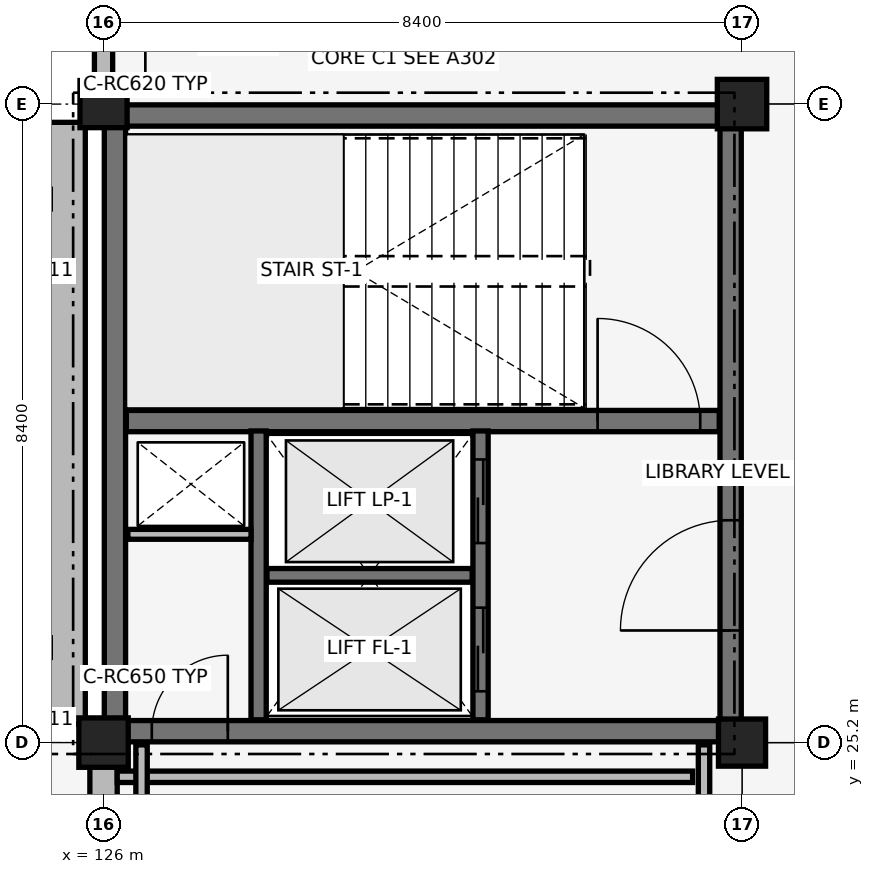
"""IFC4 building model, lengths in metres.
Left out: names, types, materials, properties, quantities, classifications, styles, units other than length and angle.
Written with IfcOpenShell. Run it as: python <this file> out.ifc"""

import sys

from ifc_helpers import new_model, si_unit, direction, frame, frame_2d, origin, origin_2d, place, context, subcontext, project, spatial, rectangle, extrude, element, fill, save


model = new_model("IFC4")
c1 = context("Model", 3, precision=1e-05, world=origin(), true_north=direction((0.0, 1.0)))
c2 = subcontext(c1, "Body", "Model", "MODEL_VIEW")
j1 = project(units=[si_unit("LENGTHUNIT", "METRE"), si_unit("PLANEANGLEUNIT", "RADIAN")], contexts=[c1])
p1 = place(None, origin())
s1 = spatial("IfcSite", under=j1, at=p1, CompositionType="ELEMENT")
p2 = place(p1, origin())
s2 = spatial("IfcBuilding", under=s1, at=p2, CompositionType="ELEMENT")
p3 = place(p2, frame((0.0, 0.0, 13.94)))
s3 = spatial("IfcBuildingStorey", under=s2, at=p3, CompositionType="ELEMENT", Elevation=13.94)
p4 = place(p3, frame((126.15, 25.35, 0.0), z_axis=(0.0, 0.0, 1.0), x_axis=(1.0, 0.0, 0.0)))
e1 = element("IfcWall", 1, at=p4, inside=s3, PredefinedType="SHEAR", context=c2, shape_type="SweptSolid", body=[
    extrude(rectangle(XDim=8.1, YDim=0.28, at=frame_2d((4.05, 0.0))), origin(), (0.0, 0.0, 1.0), 3.78),
])
p5 = place(p4, frame((0.485, 0.0, 0.0)))
e2 = element("IfcOpeningElement", 2, at=p5, cuts=e1, PredefinedType="OPENING", context=c2, shape_type="SweptSolid", body=[
    extrude(rectangle(XDim=1.0, YDim=2.15, at=frame_2d((0.5, 1.075))), frame((0.0, 0.15, 0.0), z_axis=(0.0, -1.0, 0.0), x_axis=(1.0, 0.0, 0.0)), (0.0, 0.0, 1.0), 0.3),
])
p6 = place(p3, frame((126.15, 33.45, 0.0), z_axis=(0.0, 0.0, 1.0), x_axis=(1.0, 0.0, 0.0)))
e3 = element("IfcWall", 3, at=p6, inside=s3, PredefinedType="SHEAR", context=c2, shape_type="SweptSolid", body=[
    extrude(rectangle(XDim=8.1, YDim=0.28, at=frame_2d((4.05, 0.0))), origin(), (0.0, 0.0, 1.0), 3.78),
])
p7 = place(p3, frame((126.15, 25.35, 0.0), z_axis=(0.0, 0.0, 1.0), x_axis=(0.0, 1.0, 0.0)))
e4 = element("IfcWall", 4, at=p7, inside=s3, PredefinedType="SHEAR", context=c2, shape_type="SweptSolid", body=[
    extrude(rectangle(XDim=8.1, YDim=0.28, at=frame_2d((4.05, 0.0))), origin(), (0.0, 0.0, 1.0), 3.78),
])
p8 = place(p3, frame((134.25, 25.35, 0.0), z_axis=(0.0, 0.0, 1.0), x_axis=(0.0, 1.0, 0.0)))
e5 = element("IfcWall", 5, at=p8, inside=s3, PredefinedType="SHEAR", context=c2, shape_type="SweptSolid", body=[
    extrude(rectangle(XDim=8.1, YDim=0.28, at=frame_2d((4.05, 0.0))), origin(), (0.0, 0.0, 1.0), 3.78),
])
p9 = place(p8, frame((1.325, 0.0, 0.0)))
e6 = element("IfcOpeningElement", 6, at=p9, cuts=e5, PredefinedType="OPENING", context=c2, shape_type="SweptSolid", body=[
    extrude(rectangle(XDim=1.45, YDim=2.15, at=frame_2d((0.725, 1.075))), frame((0.0, 0.15, 0.0), z_axis=(0.0, -1.0, 0.0), x_axis=(1.0, 0.0, 0.0)), (0.0, 0.0, 1.0), 0.3),
])
p10 = place(p3, frame((126.3, 29.43, 0.0), z_axis=(0.0, 0.0, 1.0), x_axis=(1.0, 0.0, 0.0)))
e7 = element("IfcWall", 7, at=p10, inside=s3, PredefinedType="SHEAR", context=c2, shape_type="SweptSolid", body=[
    extrude(rectangle(XDim=7.8, YDim=0.28, at=frame_2d((3.9, 0.0))), origin(), (0.0, 0.0, 1.0), 3.78),
])
p11 = place(p10, frame((6.2, 0.0, 0.0)))
e8 = element("IfcOpeningElement", 8, at=p11, cuts=e7, PredefinedType="OPENING", context=c2, shape_type="SweptSolid", body=[
    extrude(rectangle(XDim=1.35, YDim=2.15, at=frame_2d((0.675, 1.075))), frame((0.0, 0.15, 0.0), z_axis=(0.0, -1.0, 0.0), x_axis=(1.0, 0.0, 0.0)), (0.0, 0.0, 1.0), 0.3),
])
p12 = place(p3, frame((126.0, 25.2, 0.0), z_axis=(0.0, 0.0, 1.0), x_axis=(1.0, 0.0, 0.0)))
e9 = element("IfcColumn", 9, at=p12, inside=s3, PredefinedType="COLUMN", context=c2, shape_type="SweptSolid", body=[
    extrude(rectangle(XDim=0.65, YDim=0.65, at=origin_2d()), origin(), (0.0, 0.0, 1.0), 3.78),
])
for number, where, z_axis, x_axis in (
    (10, (126.0, 33.6, 0.0), (0.0, 0.0, 1.0), (1.0, 0.0, 0.0)),
    (11, (134.4, 25.2, 0.0), (0.0, 0.0, 1.0), (1.0, 0.0, 0.0)),
):
    element("IfcColumn", number, at=place(p3, frame(where, z_axis=z_axis, x_axis=x_axis)), inside=s3, PredefinedType="COLUMN", context=c2, shape_type="SweptSolid", body=[
        extrude(rectangle(XDim=0.62, YDim=0.62, at=origin_2d()), origin(), (0.0, 0.0, 1.0), 3.78),
    ])
p13 = place(p3, frame((134.4, 33.6, 0.0), z_axis=(0.0, 0.0, 1.0), x_axis=(1.0, 0.0, 0.0)))
e12 = element("IfcColumn", 12, at=p13, inside=s3, PredefinedType="COLUMN", context=c2, shape_type="SweptSolid", body=[
    extrude(rectangle(XDim=0.65, YDim=0.65, at=origin_2d()), origin(), (0.0, 0.0, 1.0), 3.78),
])
p14 = place(p3, frame((126.0, 17.095, 0.0), z_axis=(0.0, 0.0, 1.0), x_axis=(0.0, 1.0, 0.0)))
e13 = element("IfcWall", 13, at=p14, inside=s3, PredefinedType="SOLIDWALL", context=c2, shape_type="SweptSolid", body=[
    extrude(rectangle(XDim=7.795, YDim=0.36, at=frame_2d((3.897, 0.0))), origin(), (0.0, 0.0, 1.0), 3.15),
])
p15 = place(p14, frame((1.106, 0.0, 0.7)))
e14 = element("IfcOpeningElement", 14, at=p15, cuts=e13, PredefinedType="OPENING", context=c2, shape_type="SweptSolid", body=[
    extrude(rectangle(XDim=0.75, YDim=2.1, at=frame_2d((0.375, 1.05))), frame((0.0, 0.19, 0.0), z_axis=(0.0, -1.0, 0.0), x_axis=(1.0, 0.0, 0.0)), (0.0, 0.0, 1.0), 0.38),
])
p16 = place(p14, frame((2.665, 0.0, 0.7)))
e15 = element("IfcOpeningElement", 15, at=p16, cuts=e13, PredefinedType="OPENING", context=c2, shape_type="SweptSolid", body=[
    extrude(rectangle(XDim=0.75, YDim=2.1, at=frame_2d((0.375, 1.05))), frame((0.0, 0.19, 0.0), z_axis=(0.0, -1.0, 0.0), x_axis=(1.0, 0.0, 0.0)), (0.0, 0.0, 1.0), 0.38),
])
p17 = place(p14, frame((4.38, 0.0, 0.7)))
e16 = element("IfcOpeningElement", 16, at=p17, cuts=e13, PredefinedType="OPENING", context=c2, shape_type="SweptSolid", body=[
    extrude(rectangle(XDim=0.75, YDim=2.1, at=frame_2d((0.375, 1.05))), frame((0.0, 0.19, 0.0), z_axis=(0.0, -1.0, 0.0), x_axis=(1.0, 0.0, 0.0)), (0.0, 0.0, 1.0), 0.38),
])
p18 = place(p14, frame((5.939, 0.0, 0.7)))
e17 = element("IfcOpeningElement", 17, at=p18, cuts=e13, PredefinedType="OPENING", context=c2, shape_type="SweptSolid", body=[
    extrude(rectangle(XDim=0.75, YDim=2.1, at=frame_2d((0.375, 1.05))), frame((0.0, 0.19, 0.0), z_axis=(0.0, -1.0, 0.0), x_axis=(1.0, 0.0, 0.0)), (0.0, 0.0, 1.0), 0.38),
])
p19 = place(p3, frame((125.52, 25.44, 0.0), z_axis=(0.0, 0.0, 1.0), x_axis=(0.0, 1.0, 0.0)))
e18 = element("IfcWall", 18, at=p19, inside=s3, PredefinedType="SOLIDWALL", context=c2, shape_type="SweptSolid", body=[
    extrude(rectangle(XDim=7.92, YDim=0.48, at=frame_2d((3.96, 0.0))), origin(), (0.0, 0.0, 1.0), 4.08),
])
p20 = place(p3, frame((126.0, 33.895, 0.0), z_axis=(0.0, 0.0, 1.0), x_axis=(0.0, 1.0, 0.0)))
e19 = element("IfcWall", 19, at=p20, inside=s3, PredefinedType="SOLIDWALL", context=c2, shape_type="SweptSolid", body=[
    extrude(rectangle(XDim=7.795, YDim=0.24, at=frame_2d((3.897, 0.0))), origin(), (0.0, 0.0, 1.0), 3.15),
])
p21 = place(p20, frame((0.8, 0.0, 0.35)))
e20 = element("IfcOpeningElement", 20, at=p21, cuts=e19, PredefinedType="OPENING", context=c2, shape_type="SweptSolid", body=[
    extrude(rectangle(XDim=0.44, YDim=1.25, at=frame_2d((0.22, 0.625))), frame((0.0, 0.13, 0.0), z_axis=(0.0, -1.0, 0.0), x_axis=(1.0, 0.0, 0.0)), (0.0, 0.0, 1.0), 0.26),
])
p22 = place(p20, frame((2.239, 0.0, 0.35)))
e21 = element("IfcOpeningElement", 21, at=p22, cuts=e19, PredefinedType="OPENING", context=c2, shape_type="SweptSolid", body=[
    extrude(rectangle(XDim=0.44, YDim=1.25, at=frame_2d((0.22, 0.625))), frame((0.0, 0.13, 0.0), z_axis=(0.0, -1.0, 0.0), x_axis=(1.0, 0.0, 0.0)), (0.0, 0.0, 1.0), 0.26),
])
p23 = place(p20, frame((3.677, 0.0, 0.35)))
e22 = element("IfcOpeningElement", 22, at=p23, cuts=e19, PredefinedType="OPENING", context=c2, shape_type="SweptSolid", body=[
    extrude(rectangle(XDim=0.44, YDim=1.25, at=frame_2d((0.22, 0.625))), frame((0.0, 0.13, 0.0), z_axis=(0.0, -1.0, 0.0), x_axis=(1.0, 0.0, 0.0)), (0.0, 0.0, 1.0), 0.26),
])
p24 = place(p20, frame((5.116, 0.0, 0.35)))
e23 = element("IfcOpeningElement", 23, at=p24, cuts=e19, PredefinedType="OPENING", context=c2, shape_type="SweptSolid", body=[
    extrude(rectangle(XDim=0.44, YDim=1.25, at=frame_2d((0.22, 0.625))), frame((0.0, 0.13, 0.0), z_axis=(0.0, -1.0, 0.0), x_axis=(1.0, 0.0, 0.0)), (0.0, 0.0, 1.0), 0.26),
])
p25 = place(p20, frame((6.555, 0.0, 0.35)))
e24 = element("IfcOpeningElement", 24, at=p25, cuts=e19, PredefinedType="OPENING", context=c2, shape_type="SweptSolid", body=[
    extrude(rectangle(XDim=0.44, YDim=1.25, at=frame_2d((0.22, 0.625))), frame((0.0, 0.13, 0.0), z_axis=(0.0, -1.0, 0.0), x_axis=(1.0, 0.0, 0.0)), (0.0, 0.0, 1.0), 0.26),
])
p26 = place(p3, frame((130.96, 25.5, 0.0), z_axis=(0.0, 0.0, 1.0), x_axis=(0.0, 1.0, 0.0)))
e25 = element("IfcWall", 25, at=p26, inside=s3, PredefinedType="SHEAR", context=c2, shape_type="SweptSolid", body=[
    extrude(rectangle(XDim=3.8, YDim=0.2, at=frame_2d((1.9, 0.0))), origin(), (0.0, 0.0, 1.0), 3.78),
])
p27 = place(p26, frame((0.375, 0.0, 0.0)))
e26 = element("IfcOpeningElement", 26, at=p27, cuts=e25, PredefinedType="OPENING", context=c2, shape_type="SweptSolid", body=[
    extrude(rectangle(XDim=1.1, YDim=2.15, at=frame_2d((0.55, 1.075))), frame((0.0, 0.11, 0.0), z_axis=(0.0, -1.0, 0.0), x_axis=(1.0, 0.0, 0.0)), (0.0, 0.0, 1.0), 0.22),
])
p28 = place(p26, frame((2.325, 0.0, 0.0)))
e27 = element("IfcOpeningElement", 27, at=p28, cuts=e25, PredefinedType="OPENING", context=c2, shape_type="SweptSolid", body=[
    extrude(rectangle(XDim=1.1, YDim=2.15, at=frame_2d((0.55, 1.075))), frame((0.0, 0.11, 0.0), z_axis=(0.0, -1.0, 0.0), x_axis=(1.0, 0.0, 0.0)), (0.0, 0.0, 1.0), 0.22),
])
p29 = place(p3, frame((128.04, 25.5, 0.0), z_axis=(0.0, 0.0, 1.0), x_axis=(0.0, 1.0, 0.0)))
e28 = element("IfcWall", 28, at=p29, inside=s3, PredefinedType="SHEAR", context=c2, shape_type="SweptSolid", body=[
    extrude(rectangle(XDim=3.8, YDim=0.2, at=frame_2d((1.9, 0.0))), origin(), (0.0, 0.0, 1.0), 3.78),
])
p30 = place(p3, frame((128.15, 27.4, 0.0), z_axis=(0.0, 0.0, 1.0), x_axis=(1.0, 0.0, 0.0)))
e29 = element("IfcWall", 29, at=p30, inside=s3, PredefinedType="SHEAR", context=c2, shape_type="SweptSolid", body=[
    extrude(rectangle(XDim=2.7, YDim=0.18, at=frame_2d((1.35, 0.0))), origin(), (0.0, 0.0, 1.0), 3.78),
])
p31 = place(p3, frame((126.32, 27.94, 0.0), z_axis=(0.0, 0.0, 1.0), x_axis=(1.0, 0.0, 0.0)))
e30 = element("IfcWall", 30, at=p31, inside=s3, PredefinedType="PARTITIONING", context=c2, shape_type="SweptSolid", body=[
    extrude(rectangle(XDim=1.62, YDim=0.13, at=frame_2d((0.81, 0.0))), origin(), (0.0, 0.0, 1.0), 3.78),
])
p32 = place(p3, frame((126.18, 24.75, 0.0), z_axis=(0.0, 0.0, 1.0), x_axis=(1.0, 0.0, 0.0)))
e31 = element("IfcWall", 31, at=p32, inside=s3, PredefinedType="PARTITIONING", context=c2, shape_type="SweptSolid", body=[
    extrude(rectangle(XDim=7.57, YDim=0.15, at=frame_2d((3.785, 0.0))), origin(), (0.0, 0.0, 1.0), 3.15),
])
p33 = place(p3, frame((133.9, 16.78, 0.0), z_axis=(0.0, 0.0, 1.0), x_axis=(0.0, 1.0, 0.0)))
e32 = element("IfcWall", 32, at=p33, inside=s3, PredefinedType="PARTITIONING", context=c2, shape_type="SweptSolid", body=[
    extrude(rectangle(XDim=8.39, YDim=0.15, at=frame_2d((4.195, 0.0))), origin(), (0.0, 0.0, 1.0), 3.13),
])
p34 = place(p33, frame((3.67, 0.0, 0.0)))
e33 = element("IfcOpeningElement", 33, at=p34, cuts=e32, PredefinedType="OPENING", context=c2, shape_type="SweptSolid", body=[
    extrude(rectangle(XDim=1.05, YDim=2.15, at=frame_2d((0.525, 1.075))), frame((0.0, 0.085, 0.0), z_axis=(0.0, -1.0, 0.0), x_axis=(1.0, 0.0, 0.0)), (0.0, 0.0, 1.0), 0.17),
])
p35 = place(p3, frame((126.5, 16.78, 0.0), z_axis=(0.0, 0.0, 1.0), x_axis=(0.0, 1.0, 0.0)))
e34 = element("IfcWall", 34, at=p35, inside=s3, PredefinedType="PARTITIONING", context=c2, shape_type="SweptSolid", body=[
    extrude(rectangle(XDim=8.39, YDim=0.15, at=frame_2d((4.195, 0.0))), origin(), (0.0, 0.0, 1.0), 3.13),
])
p36 = place(p11, origin())
e35 = element("IfcDoor", 35, at=p36, inside=s3, OperationType="SINGLE_SWING_LEFT", PredefinedType="DOOR", context=c2, shape_type="SweptSolid", body=[
    extrude(rectangle(XDim=1.35, YDim=2.15, at=frame_2d((0.675, 1.075))), frame((0.0, 0.025, 0.0), z_axis=(0.0, -1.0, 0.0), x_axis=(1.0, 0.0, 0.0)), (0.0, 0.0, 1.0), 0.05),
])
fill(e8, e35)
p37 = place(p27, origin())
e36 = element("IfcDoor", 36, at=p37, inside=s3, OperationType="SLIDING_TO_LEFT", PredefinedType="DOOR", context=c2, shape_type="SweptSolid", body=[
    extrude(rectangle(XDim=1.1, YDim=2.15, at=frame_2d((0.55, 1.075))), frame((0.0, 0.025, 0.0), z_axis=(0.0, -1.0, 0.0), x_axis=(1.0, 0.0, 0.0)), (0.0, 0.0, 1.0), 0.05),
])
fill(e26, e36)
p38 = place(p28, origin())
e37 = element("IfcDoor", 37, at=p38, inside=s3, OperationType="SLIDING_TO_LEFT", PredefinedType="DOOR", context=c2, shape_type="SweptSolid", body=[
    extrude(rectangle(XDim=1.1, YDim=2.15, at=frame_2d((0.55, 1.075))), frame((0.0, 0.025, 0.0), z_axis=(0.0, -1.0, 0.0), x_axis=(1.0, 0.0, 0.0)), (0.0, 0.0, 1.0), 0.05),
])
fill(e27, e37)
p39 = place(p9, origin())
e38 = element("IfcDoor", 38, at=p39, inside=s3, OperationType="DOUBLE_DOOR_SINGLE_SWING", PredefinedType="DOOR", context=c2, shape_type="SweptSolid", body=[
    extrude(rectangle(XDim=1.45, YDim=2.15, at=frame_2d((0.725, 1.075))), frame((0.0, 0.025, 0.0), z_axis=(0.0, -1.0, 0.0), x_axis=(1.0, 0.0, 0.0)), (0.0, 0.0, 1.0), 0.05),
])
fill(e6, e38)
p40 = place(p5, origin())
e39 = element("IfcDoor", 39, at=p40, inside=s3, OperationType="SINGLE_SWING_RIGHT", PredefinedType="DOOR", context=c2, shape_type="SweptSolid", body=[
    extrude(rectangle(XDim=1.0, YDim=2.15, at=frame_2d((0.5, 1.075))), frame((0.0, 0.025, 0.0), z_axis=(0.0, -1.0, 0.0), x_axis=(1.0, 0.0, 0.0)), (0.0, 0.0, 1.0), 0.05),
])
fill(e2, e39)
save(model, sys.argv[1])
